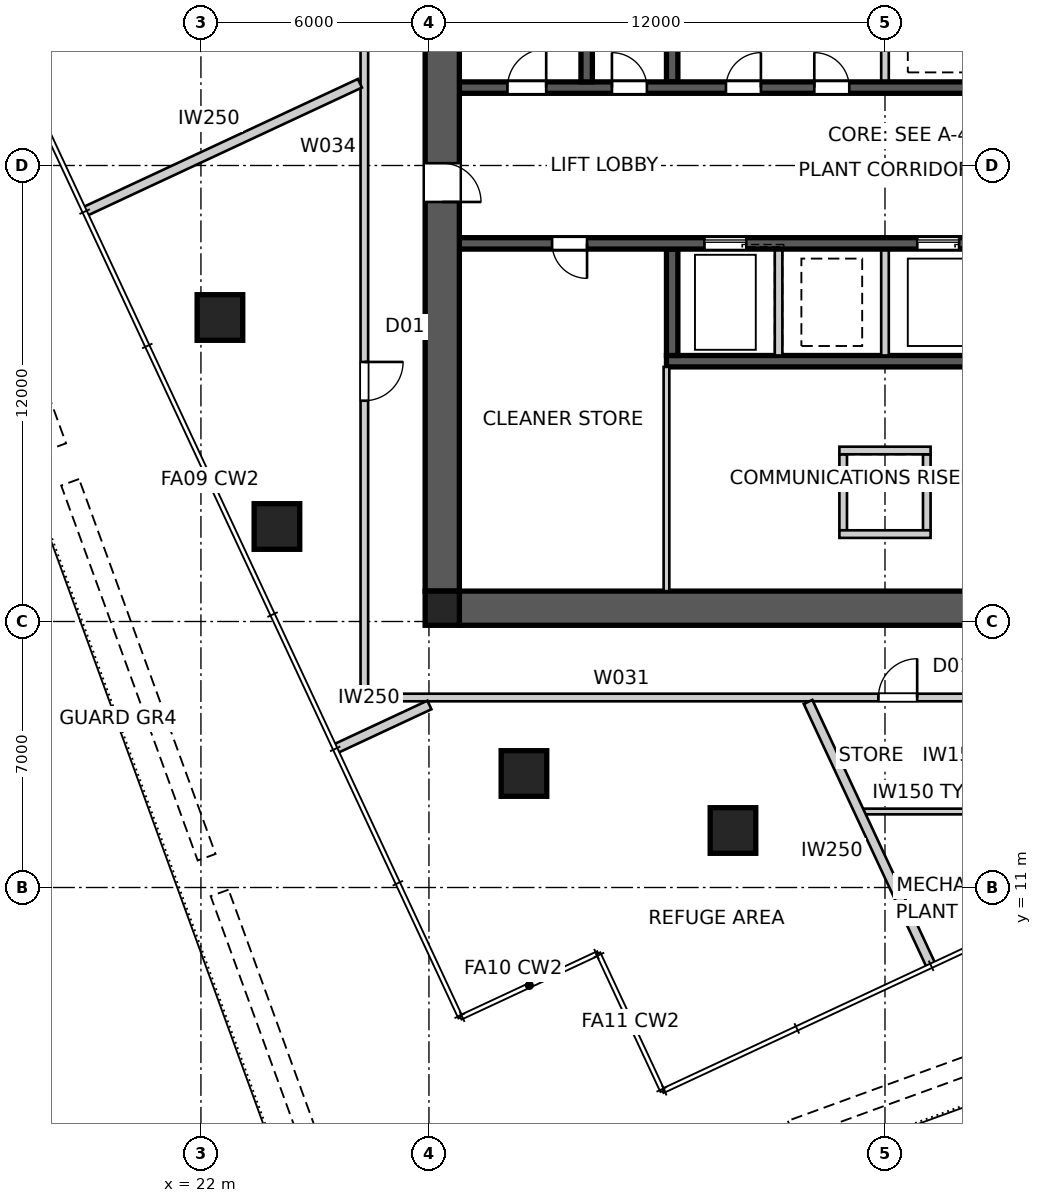
"""IFC4 building model, lengths in metres.
Left out: names, types, materials, properties, quantities, classifications, styles, units other than length and angle.
Written with IfcOpenShell. Run it as: python <this file> out.ifc"""

import sys

from ifc_helpers import new_model, si_unit, direction, frame, frame_2d, origin, origin_2d, place, context, subcontext, project, spatial, polyline, rectangle, outline, extrude, element, fill, save


model = new_model("IFC4")
c1 = context("Model", 3, precision=1e-05, world=origin(), true_north=direction((0.0, 1.0)))
c2 = subcontext(c1, "Body", "Model", "MODEL_VIEW")
j1 = project(units=[si_unit("LENGTHUNIT", "METRE"), si_unit("PLANEANGLEUNIT", "RADIAN")], contexts=[c1])
p1 = place(None, origin())
s1 = spatial("IfcSite", under=j1, at=p1, CompositionType="ELEMENT")
p2 = place(p1, origin())
s2 = spatial("IfcBuilding", under=s1, at=p2, CompositionType="ELEMENT")
p3 = place(p2, frame((0.0, 0.0, 171.0)))
s3 = spatial("IfcBuildingStorey", under=s2, at=p3, CompositionType="ELEMENT", Elevation=171.0)
p4 = place(p3, frame((51.2, 18.35, 0.0), z_axis=(0.0, 0.0, 1.0), x_axis=(-1.0, 0.0, 0.0)))
e1 = element("IfcWall", 1, at=p4, inside=s3, PredefinedType="SHEAR", context=c2, shape_type="SweptSolid", body=[
    extrude(outline(polyline([(0.0, -0.45), (22.4, -0.45), (22.4, -0.025), (22.85, -0.025), (22.85, 0.025), (22.4, 0.025), (22.4, 0.45), (0.0, 0.45), (0.0, 0.025), (-0.45, 0.025), (-0.45, -0.025), (0.0, -0.025), (0.0, -0.45)])), origin(), (0.0, 0.0, 1.0), 5.0),
])
p5 = place(p3, frame((28.35, 41.2, 0.0), z_axis=(0.0, 0.0, 1.0), x_axis=(0.0, -1.0, 0.0)))
e2 = element("IfcWall", 2, at=p5, inside=s3, PredefinedType="SHEAR", context=c2, shape_type="SweptSolid", body=[
    extrude(outline(polyline([(0.0, -0.45), (22.4, -0.45), (22.4, -0.025), (22.85, -0.025), (22.85, 0.025), (22.4, 0.025), (22.4, 0.45), (0.0, 0.45), (0.0, 0.025), (-0.45, 0.025), (-0.45, -0.025), (0.0, -0.025), (0.0, -0.45)])), origin(), (0.0, 0.0, 1.0), 5.0),
])
p6 = place(p5, frame((11.14, 0.0, 0.0)))
e3 = element("IfcOpeningElement", 3, at=p6, cuts=e2, PredefinedType="OPENING", context=c2, shape_type="SweptSolid", body=[
    extrude(rectangle(XDim=1.02, YDim=2.4, at=frame_2d((0.51, 1.2))), frame((0.0, 0.46, 0.0), z_axis=(0.0, -1.0, 0.0), x_axis=(1.0, 0.0, 0.0)), (0.0, 0.0, 1.0), 0.92),
])
p7 = place(p3, frame((28.8, 32.05, 0.0), z_axis=(0.0, 0.0, 1.0), x_axis=(1.0, 0.0, 0.0)))
e4 = element("IfcWall", 4, at=p7, inside=s3, PredefinedType="SHEAR", context=c2, shape_type="SweptSolid", body=[
    extrude(rectangle(XDim=22.4, YDim=0.3, at=frame_2d((11.2, 0.0))), origin(), (0.0, 0.0, 1.0), 5.0),
])
p8 = place(p7, frame((19.04, 0.0, 0.0)))
e5 = element("IfcOpeningElement", 5, at=p8, cuts=e4, PredefinedType="OPENING", context=c2, shape_type="SweptSolid", body=[
    extrude(rectangle(XDim=0.92, YDim=2.1, at=frame_2d((0.46, 1.05))), frame((0.0, 0.16, 0.0), z_axis=(0.0, -1.0, 0.0), x_axis=(1.0, 0.0, 0.0)), (0.0, 0.0, 1.0), 0.32),
])
p9 = place(p7, frame((1.265, 0.0, 0.0)))
e6 = element("IfcOpeningElement", 6, at=p9, cuts=e4, PredefinedType="OPENING", context=c2, shape_type="SweptSolid", body=[
    extrude(rectangle(XDim=1.02, YDim=2.1, at=frame_2d((0.51, 1.05))), frame((0.0, 0.16, 0.0), z_axis=(0.0, -1.0, 0.0), x_axis=(1.0, 0.0, 0.0)), (0.0, 0.0, 1.0), 0.32),
])
p10 = place(p7, frame((4.015, 0.0, 0.0)))
e7 = element("IfcOpeningElement", 7, at=p10, cuts=e4, PredefinedType="OPENING", context=c2, shape_type="SweptSolid", body=[
    extrude(rectangle(XDim=0.92, YDim=2.1, at=frame_2d((0.46, 1.05))), frame((0.0, 0.16, 0.0), z_axis=(0.0, -1.0, 0.0), x_axis=(1.0, 0.0, 0.0)), (0.0, 0.0, 1.0), 0.32),
])
p11 = place(p7, frame((7.015, 0.0, 0.0)))
e8 = element("IfcOpeningElement", 8, at=p11, cuts=e4, PredefinedType="OPENING", context=c2, shape_type="SweptSolid", body=[
    extrude(rectangle(XDim=0.92, YDim=2.1, at=frame_2d((0.46, 1.05))), frame((0.0, 0.16, 0.0), z_axis=(0.0, -1.0, 0.0), x_axis=(1.0, 0.0, 0.0)), (0.0, 0.0, 1.0), 0.32),
])
p12 = place(p7, frame((9.34, 0.0, 0.0)))
e9 = element("IfcOpeningElement", 9, at=p12, cuts=e4, PredefinedType="OPENING", context=c2, shape_type="SweptSolid", body=[
    extrude(rectangle(XDim=0.92, YDim=2.1, at=frame_2d((0.46, 1.05))), frame((0.0, 0.16, 0.0), z_axis=(0.0, -1.0, 0.0), x_axis=(1.0, 0.0, 0.0)), (0.0, 0.0, 1.0), 0.32),
])
p13 = place(p7, frame((14.85, 0.0, 0.0)))
e10 = element("IfcOpeningElement", 10, at=p13, cuts=e4, PredefinedType="OPENING", context=c2, shape_type="SweptSolid", body=[
    extrude(rectangle(XDim=1.1, YDim=2.1, at=frame_2d((0.55, 1.05))), frame((0.0, 0.16, 0.0), z_axis=(0.0, -1.0, 0.0), x_axis=(1.0, 0.0, 0.0)), (0.0, 0.0, 1.0), 0.32),
])
p14 = place(p3, frame((51.2, 27.95, 0.0), z_axis=(0.0, 0.0, 1.0), x_axis=(-1.0, 0.0, 0.0)))
e11 = element("IfcWall", 11, at=p14, inside=s3, PredefinedType="SHEAR", context=c2, shape_type="SweptSolid", body=[
    extrude(rectangle(XDim=22.4, YDim=0.3, at=frame_2d((11.2, 0.0))), origin(), (0.0, 0.0, 1.0), 5.0),
])
p15 = place(p14, frame((19.04, 0.0, 0.0)))
e12 = element("IfcOpeningElement", 12, at=p15, cuts=e11, PredefinedType="OPENING", context=c2, shape_type="SweptSolid", body=[
    extrude(rectangle(XDim=0.92, YDim=2.1, at=frame_2d((0.46, 1.05))), frame((0.0, 0.16, 0.0), z_axis=(0.0, -1.0, 0.0), x_axis=(1.0, 0.0, 0.0)), (0.0, 0.0, 1.0), 0.32),
])
p16 = place(p14, frame((1.265, 0.0, 0.0)))
e13 = element("IfcOpeningElement", 13, at=p16, cuts=e11, PredefinedType="OPENING", context=c2, shape_type="SweptSolid", body=[
    extrude(rectangle(XDim=1.02, YDim=2.1, at=frame_2d((0.51, 1.05))), frame((0.0, 0.16, 0.0), z_axis=(0.0, -1.0, 0.0), x_axis=(1.0, 0.0, 0.0)), (0.0, 0.0, 1.0), 0.32),
])
p17 = place(p14, frame((4.015, 0.0, 0.0)))
e14 = element("IfcOpeningElement", 14, at=p17, cuts=e11, PredefinedType="OPENING", context=c2, shape_type="SweptSolid", body=[
    extrude(rectangle(XDim=0.92, YDim=2.1, at=frame_2d((0.46, 1.05))), frame((0.0, 0.16, 0.0), z_axis=(0.0, -1.0, 0.0), x_axis=(1.0, 0.0, 0.0)), (0.0, 0.0, 1.0), 0.32),
])
p18 = place(p14, frame((6.45, 0.0, 0.0)))
e15 = element("IfcOpeningElement", 15, at=p18, cuts=e11, PredefinedType="OPENING", context=c2, shape_type="SweptSolid", body=[
    extrude(rectangle(XDim=1.1, YDim=2.1, at=frame_2d((0.55, 1.05))), frame((0.0, 0.16, 0.0), z_axis=(0.0, -1.0, 0.0), x_axis=(1.0, 0.0, 0.0)), (0.0, 0.0, 1.0), 0.32),
])
p19 = place(p14, frame((9.25, 0.0, 0.0)))
e16 = element("IfcOpeningElement", 16, at=p19, cuts=e11, PredefinedType="OPENING", context=c2, shape_type="SweptSolid", body=[
    extrude(rectangle(XDim=1.1, YDim=2.1, at=frame_2d((0.55, 1.05))), frame((0.0, 0.16, 0.0), z_axis=(0.0, -1.0, 0.0), x_axis=(1.0, 0.0, 0.0)), (0.0, 0.0, 1.0), 0.32),
])
p20 = place(p14, frame((14.85, 0.0, 0.0)))
e17 = element("IfcOpeningElement", 17, at=p20, cuts=e11, PredefinedType="OPENING", context=c2, shape_type="SweptSolid", body=[
    extrude(rectangle(XDim=1.1, YDim=2.1, at=frame_2d((0.55, 1.05))), frame((0.0, 0.16, 0.0), z_axis=(0.0, -1.0, 0.0), x_axis=(1.0, 0.0, 0.0)), (0.0, 0.0, 1.0), 0.32),
])
p21 = place(p3, frame((45.75, 24.85, 0.0), z_axis=(0.0, 0.0, 1.0), x_axis=(-1.0, 0.0, 0.0)))
e18 = element("IfcWall", 18, at=p21, inside=s3, PredefinedType="SHEAR", context=c2, shape_type="SweptSolid", body=[
    extrude(rectangle(XDim=11.5, YDim=0.3, at=frame_2d((5.75, 0.0))), origin(), (0.0, 0.0, 1.0), 5.0),
])
p22 = place(p3, frame((34.4, 32.2, 0.0), z_axis=(0.0, 0.0, 1.0), x_axis=(0.0, 1.0, 0.0)))
e19 = element("IfcWall", 19, at=p22, inside=s3, PredefinedType="SHEAR", context=c2, shape_type="SweptSolid", body=[
    extrude(rectangle(XDim=2.8, YDim=0.3, at=frame_2d((1.4, 0.0))), origin(), (0.0, 0.0, 1.0), 5.0),
])
for number, where, z_axis, x_axis in (
    (20, (40.0, 32.2, 0.0), (0.0, 0.0, 1.0), (0.0, 1.0, 0.0)),
    (21, (40.0, 27.8, 0.0), (0.0, 0.0, 1.0), (0.0, -1.0, 0.0)),
    (22, (37.2, 27.8, 0.0), (0.0, 0.0, 1.0), (0.0, -1.0, 0.0)),
):
    element("IfcWall", number, at=place(p3, frame(where, z_axis=z_axis, x_axis=x_axis)), inside=s3, PredefinedType="SOLIDWALL", context=c2, shape_type="SweptSolid", body=[
        extrude(rectangle(XDim=2.8, YDim=0.2, at=frame_2d((1.4, 0.0))), origin(), (0.0, 0.0, 1.0), 5.0),
    ])
p23 = place(p3, frame((34.4, 27.8, 0.0), z_axis=(0.0, 0.0, 1.0), x_axis=(0.0, -1.0, 0.0)))
e23 = element("IfcWall", 23, at=p23, inside=s3, PredefinedType="SHEAR", context=c2, shape_type="SweptSolid", body=[
    extrude(rectangle(XDim=2.8, YDim=0.3, at=frame_2d((1.4, 0.0))), origin(), (0.0, 0.0, 1.0), 5.0),
])
p24 = place(p3, frame((32.15, 32.2, 0.0), z_axis=(0.0, 0.0, 1.0), x_axis=(0.0, 1.0, 0.0)))
e24 = element("IfcWall", 24, at=p24, inside=s3, PredefinedType="SHEAR", context=c2, shape_type="SweptSolid", body=[
    extrude(rectangle(XDim=7.7, YDim=0.3, at=frame_2d((3.85, 0.0))), origin(), (0.0, 0.0, 1.0), 5.0),
])
for number, where, z_axis, x_axis in (
    (25, (38.9, 22.4, 0.0), (0.0, 0.0, 1.0), (0.0, -1.0, 0.0)),
    (26, (41.1, 22.4, 0.0), (0.0, 0.0, 1.0), (0.0, -1.0, 0.0)),
):
    element("IfcWall", number, at=place(p3, frame(where, z_axis=z_axis, x_axis=x_axis)), inside=s3, PredefinedType="SOLIDWALL", context=c2, shape_type="SweptSolid", body=[
        extrude(rectangle(XDim=2.0, YDim=0.2, at=frame_2d((1.0, 0.0))), origin(), (0.0, 0.0, 1.0), 5.0),
    ])
for number, where, z_axis, x_axis in (
    (27, (38.8, 22.5, 0.0), (0.0, 0.0, 1.0), (1.0, 0.0, 0.0)),
    (28, (38.8, 20.3, 0.0), (0.0, 0.0, 1.0), (1.0, 0.0, 0.0)),
):
    element("IfcWall", number, at=place(p3, frame(where, z_axis=z_axis, x_axis=x_axis)), inside=s3, PredefinedType="SOLIDWALL", context=c2, shape_type="SweptSolid", body=[
        extrude(rectangle(XDim=2.4, YDim=0.2, at=frame_2d((1.2, 0.0))), origin(), (0.0, 0.0, 1.0), 5.0),
    ])
p25 = place(p3, frame((28.35, 18.35, 0.0), z_axis=(0.0, 0.0, 1.0), x_axis=(1.0, 0.0, 0.0)))
e29 = element("IfcColumn", 29, at=p25, inside=s3, PredefinedType="COLUMN", context=c2, shape_type="SweptSolid", body=[
    extrude(rectangle(XDim=0.9, YDim=0.9, at=origin_2d()), origin(), (0.0, 0.0, 1.0), 5.0),
])
for number, where, z_axis, x_axis in (
    (30, (22.5, 26.0, 0.0), (0.0, 0.0, 1.0), (1.0, 0.0, 0.0)),
    (31, (24.0, 20.5, 0.0), (0.0, 0.0, 1.0), (1.0, 0.0, 0.0)),
    (32, (30.5, 14.0, 0.0), (0.0, 0.0, 1.0), (1.0, 0.0, 0.0)),
    (33, (36.0, 12.5, 0.0), (0.0, 0.0, 1.0), (1.0, 0.0, 0.0)),
):
    element("IfcColumn", number, at=place(p3, frame(where, z_axis=z_axis, x_axis=x_axis)), inside=s3, PredefinedType="COLUMN", context=c2, shape_type="SweptSolid", body=[
        extrude(rectangle(XDim=1.2, YDim=1.2, at=origin_2d()), origin(), (0.0, 0.0, 1.0), 5.0),
    ])
p26 = place(p3, frame((26.3, 16.0, 0.0), z_axis=(0.0, 0.0, 1.0), x_axis=(1.0, 0.0, 0.0)))
e34 = element("IfcWall", 34, at=p26, inside=s3, PredefinedType="PARTITIONING", context=c2, shape_type="SweptSolid", body=[
    extrude(rectangle(XDim=27.4, YDim=0.2, at=frame_2d((13.7, 0.0))), origin(), (0.0, 0.0, 1.0), 4.85),
])
p27 = place(p26, frame((18.802, 0.0, 0.0)))
e35 = element("IfcOpeningElement", 35, at=p27, cuts=e34, PredefinedType="OPENING", context=c2, shape_type="SweptSolid", body=[
    extrude(rectangle(XDim=1.02, YDim=2.34, at=frame_2d((0.51, 1.17))), frame((0.0, 0.11, 0.0), z_axis=(0.0, -1.0, 0.0), x_axis=(1.0, 0.0, 0.0)), (0.0, 0.0, 1.0), 0.22),
])
p28 = place(p26, frame((13.527, 0.0, 0.0)))
e36 = element("IfcOpeningElement", 36, at=p28, cuts=e34, PredefinedType="OPENING", context=c2, shape_type="SweptSolid", body=[
    extrude(rectangle(XDim=1.02, YDim=2.34, at=frame_2d((0.51, 1.17))), frame((0.0, 0.11, 0.0), z_axis=(0.0, -1.0, 0.0), x_axis=(1.0, 0.0, 0.0)), (0.0, 0.0, 1.0), 0.22),
])
p29 = place(p26, frame((25.865, 0.0, 0.0)))
e37 = element("IfcOpeningElement", 37, at=p29, cuts=e34, PredefinedType="OPENING", context=c2, shape_type="SweptSolid", body=[
    extrude(rectangle(XDim=1.02, YDim=2.34, at=frame_2d((0.51, 1.17))), frame((0.0, 0.11, 0.0), z_axis=(0.0, -1.0, 0.0), x_axis=(1.0, 0.0, 0.0)), (0.0, 0.0, 1.0), 0.22),
])
p30 = place(p3, frame((26.3, 43.7, 0.0), z_axis=(0.0, 0.0, 1.0), x_axis=(0.0, -1.0, 0.0)))
e38 = element("IfcWall", 38, at=p30, inside=s3, PredefinedType="PARTITIONING", context=c2, shape_type="SweptSolid", body=[
    extrude(rectangle(XDim=27.7, YDim=0.2, at=frame_2d((13.85, 0.0))), origin(), (0.0, 0.0, 1.0), 4.85),
])
p31 = place(p30, frame((18.87, 0.0, 0.0)))
e39 = element("IfcOpeningElement", 39, at=p31, cuts=e38, PredefinedType="OPENING", context=c2, shape_type="SweptSolid", body=[
    extrude(rectangle(XDim=1.02, YDim=2.34, at=frame_2d((0.51, 1.17))), frame((0.0, 0.11, 0.0), z_axis=(0.0, -1.0, 0.0), x_axis=(1.0, 0.0, 0.0)), (0.0, 0.0, 1.0), 0.22),
])
p32 = place(p30, frame((6.545, 0.0, 0.0)))
e40 = element("IfcOpeningElement", 40, at=p32, cuts=e38, PredefinedType="OPENING", context=c2, shape_type="SweptSolid", body=[
    extrude(rectangle(XDim=1.02, YDim=2.34, at=frame_2d((0.51, 1.17))), frame((0.0, 0.11, 0.0), z_axis=(0.0, -1.0, 0.0), x_axis=(1.0, 0.0, 0.0)), (0.0, 0.0, 1.0), 0.22),
])
p33 = place(p3, frame((41.214, 8.94, 0.0), z_axis=(0.0, 0.0, 1.0), x_axis=(-0.42261155821, 0.906310912914, 0.0)))
e41 = element("IfcWall", 41, at=p33, inside=s3, PredefinedType="PARTITIONING", context=c2, shape_type="SweptSolid", body=[
    extrude(rectangle(XDim=7.661, YDim=0.25, at=frame_2d((3.831, 0.0))), origin(), (0.0, 0.0, 1.0), 4.85),
])
p34 = place(p3, frame((18.94, 28.786, 0.0), z_axis=(0.0, 0.0, 1.0), x_axis=(0.906306405344, 0.422621224778, 0.0)))
e42 = element("IfcWall", 42, at=p34, inside=s3, PredefinedType="PARTITIONING", context=c2, shape_type="SweptSolid", body=[
    extrude(rectangle(XDim=7.992, YDim=0.25, at=frame_2d((3.996, 0.0))), origin(), (0.0, 0.0, 1.0), 4.85),
])
p35 = place(p3, frame((25.533, 14.647, 0.0), z_axis=(0.0, 0.0, 1.0), x_axis=(0.906301654208, 0.422631413384, 0.0)))
e43 = element("IfcWall", 43, at=p35, inside=s3, PredefinedType="PARTITIONING", context=c2, shape_type="SweptSolid", body=[
    extrude(rectangle(XDim=2.736, YDim=0.25, at=frame_2d((1.368, 0.0))), origin(), (0.0, 0.0, 1.0), 4.85),
])
p36 = place(p3, frame((34.25, 18.8, 0.0), z_axis=(0.0, 0.0, 1.0), x_axis=(0.0, 1.0, 0.0)))
e44 = element("IfcWall", 44, at=p36, inside=s3, PredefinedType="SOLIDWALL", context=c2, shape_type="SweptSolid", body=[
    extrude(rectangle(XDim=5.9, YDim=0.15, at=frame_2d((2.95, 0.0))), origin(), (0.0, 0.0, 1.0), 4.85),
])
p37 = place(p3, frame((44.988, 13.0, 0.0), z_axis=(0.0, 0.0, 1.0), x_axis=(-1.0, 0.0, 0.0)))
e45 = element("IfcWall", 45, at=p37, inside=s3, PredefinedType="SOLIDWALL", context=c2, shape_type="SweptSolid", body=[
    extrude(rectangle(XDim=5.667, YDim=0.15, at=frame_2d((2.834, 0.0))), origin(), (0.0, 0.0, 1.0), 4.85),
])
p38 = place(p15, origin())
e46 = element("IfcDoor", 46, at=p38, inside=s3, OperationType="SINGLE_SWING_LEFT", PredefinedType="DOOR", context=c2, shape_type="SweptSolid", body=[
    extrude(rectangle(XDim=0.92, YDim=2.1, at=frame_2d((0.46, 1.05))), frame((0.0, 0.025, 0.0), z_axis=(0.0, -1.0, 0.0), x_axis=(1.0, 0.0, 0.0)), (0.0, 0.0, 1.0), 0.05),
])
fill(e12, e46)
p39 = place(p9, origin())
e47 = element("IfcDoor", 47, at=p39, inside=s3, OperationType="SINGLE_SWING_RIGHT", PredefinedType="DOOR", context=c2, shape_type="SweptSolid", body=[
    extrude(rectangle(XDim=1.02, YDim=2.1, at=frame_2d((0.51, 1.05))), frame((0.0, 0.025, 0.0), z_axis=(0.0, -1.0, 0.0), x_axis=(1.0, 0.0, 0.0)), (0.0, 0.0, 1.0), 0.05),
])
fill(e6, e47)
p40 = place(p10, origin())
e48 = element("IfcDoor", 48, at=p40, inside=s3, OperationType="SINGLE_SWING_LEFT", PredefinedType="DOOR", context=c2, shape_type="SweptSolid", body=[
    extrude(rectangle(XDim=0.92, YDim=2.1, at=frame_2d((0.46, 1.05))), frame((0.0, 0.025, 0.0), z_axis=(0.0, -1.0, 0.0), x_axis=(1.0, 0.0, 0.0)), (0.0, 0.0, 1.0), 0.05),
])
fill(e7, e48)
p41 = place(p31, origin())
e49 = element("IfcDoor", 49, at=p41, inside=s3, OperationType="SINGLE_SWING_LEFT", PredefinedType="DOOR", context=c2, shape_type="SweptSolid", body=[
    extrude(rectangle(XDim=1.02, YDim=2.34, at=frame_2d((0.51, 1.17))), frame((0.0, 0.025, 0.0), z_axis=(0.0, -1.0, 0.0), x_axis=(1.0, 0.0, 0.0)), (0.0, 0.0, 1.0), 0.05),
])
fill(e39, e49)
p42 = place(p28, origin())
e50 = element("IfcDoor", 50, at=p42, inside=s3, OperationType="SINGLE_SWING_RIGHT", PredefinedType="DOOR", context=c2, shape_type="SweptSolid", body=[
    extrude(rectangle(XDim=1.02, YDim=2.34, at=frame_2d((0.51, 1.17))), frame((0.0, 0.025, 0.0), z_axis=(0.0, -1.0, 0.0), x_axis=(1.0, 0.0, 0.0)), (0.0, 0.0, 1.0), 0.05),
])
fill(e36, e50)
p43 = place(p11, origin())
e51 = element("IfcDoor", 51, at=p43, inside=s3, OperationType="SINGLE_SWING_RIGHT", PredefinedType="DOOR", context=c2, shape_type="SweptSolid", body=[
    extrude(rectangle(XDim=0.92, YDim=2.1, at=frame_2d((0.46, 1.05))), frame((0.0, 0.025, 0.0), z_axis=(0.0, -1.0, 0.0), x_axis=(1.0, 0.0, 0.0)), (0.0, 0.0, 1.0), 0.05),
])
fill(e8, e51)
p44 = place(p12, origin())
e52 = element("IfcDoor", 52, at=p44, inside=s3, OperationType="SINGLE_SWING_LEFT", PredefinedType="DOOR", context=c2, shape_type="SweptSolid", body=[
    extrude(rectangle(XDim=0.92, YDim=2.1, at=frame_2d((0.46, 1.05))), frame((0.0, 0.025, 0.0), z_axis=(0.0, -1.0, 0.0), x_axis=(1.0, 0.0, 0.0)), (0.0, 0.0, 1.0), 0.05),
])
fill(e9, e52)
p45 = place(p6, origin())
e53 = element("IfcDoor", 53, at=p45, inside=s3, OperationType="SINGLE_SWING_RIGHT", PredefinedType="DOOR", context=c2, shape_type="SweptSolid", body=[
    extrude(rectangle(XDim=1.02, YDim=2.4, at=frame_2d((0.51, 1.2))), frame((0.0, 0.025, 0.0), z_axis=(0.0, -1.0, 0.0), x_axis=(1.0, 0.0, 0.0)), (0.0, 0.0, 1.0), 0.05),
])
fill(e3, e53)
p46 = place(p19, origin())
e54 = element("IfcDoor", 54, at=p46, inside=s3, OperationType="SLIDING_TO_LEFT", PredefinedType="DOOR", context=c2, shape_type="SweptSolid", body=[
    extrude(rectangle(XDim=1.1, YDim=2.1, at=frame_2d((0.55, 1.05))), frame((0.0, 0.025, 0.0), z_axis=(0.0, -1.0, 0.0), x_axis=(1.0, 0.0, 0.0)), (0.0, 0.0, 1.0), 0.05),
])
fill(e16, e54)
p47 = place(p20, origin())
e55 = element("IfcDoor", 55, at=p47, inside=s3, OperationType="SLIDING_TO_LEFT", PredefinedType="DOOR", context=c2, shape_type="SweptSolid", body=[
    extrude(rectangle(XDim=1.1, YDim=2.1, at=frame_2d((0.55, 1.05))), frame((0.0, 0.025, 0.0), z_axis=(0.0, -1.0, 0.0), x_axis=(1.0, 0.0, 0.0)), (0.0, 0.0, 1.0), 0.05),
])
fill(e17, e55)
save(model, sys.argv[1])
